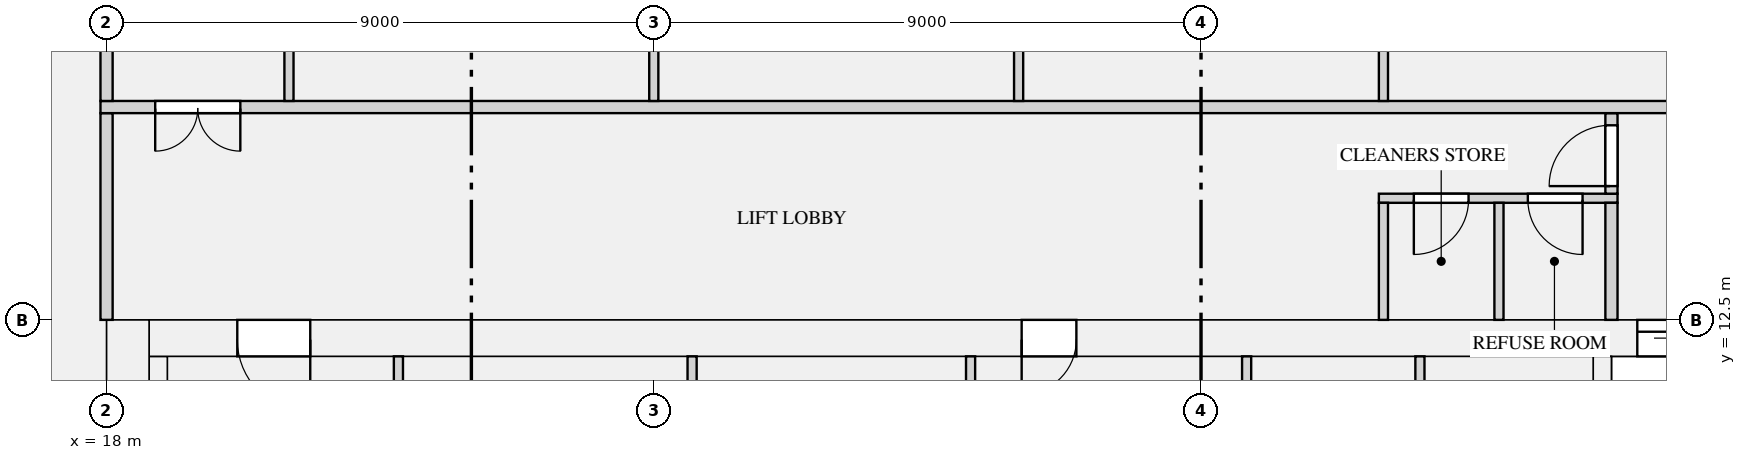
"""IFC4 building model, lengths in metres.
Left out: names, types, materials, properties, quantities, classifications, styles, units other than length and angle.
Written with IfcOpenShell. Run it as: python <this file> out.ifc"""

import sys

from ifc_helpers import new_model, si_unit, direction, frame, frame_2d, origin, place, context, subcontext, project, spatial, rectangle, extrude, element, fill, save


model = new_model("IFC4")
c1 = context("Model", 3, precision=1e-05, world=origin(), true_north=direction((0.0, 1.0)))
c2 = subcontext(c1, "Body", "Model", "MODEL_VIEW")
j1 = project(units=[si_unit("LENGTHUNIT", "METRE"), si_unit("PLANEANGLEUNIT", "RADIAN")], contexts=[c1])
p1 = place(None, origin())
s1 = spatial("IfcSite", under=j1, at=p1, CompositionType="ELEMENT")
p2 = place(p1, origin())
s2 = spatial("IfcBuilding", under=s1, at=p2, CompositionType="ELEMENT")
p3 = place(p2, frame((0.0, 0.0, 141.3)))
s3 = spatial("IfcBuildingStorey", under=s2, at=p3, CompositionType="ELEMENT", Elevation=141.3)
p4 = place(p3, frame((18.35, 0.0, 0.0), z_axis=(0.0, 0.0, 1.0), x_axis=(0.0, 1.0, 0.0)))
e1 = element("IfcWall", 1, at=p4, inside=s3, PredefinedType="SHEAR", context=c2, shape_type="SweptSolid", body=[
    extrude(rectangle(XDim=12.5, YDim=0.7, at=frame_2d((6.25, 0.0))), origin(), (0.0, 0.0, 1.0), 3.15),
])
p5 = place(p3, frame((18.7, 12.2, 0.0), z_axis=(0.0, 0.0, 1.0), x_axis=(1.0, 0.0, 0.0)))
e2 = element("IfcWall", 2, at=p5, inside=s3, PredefinedType="SHEAR", context=c2, shape_type="SweptSolid", body=[
    extrude(rectangle(XDim=34.6, YDim=0.6, at=frame_2d((17.3, 0.0))), origin(), (0.0, 0.0, 1.0), 3.15),
])
p6 = place(p5, frame((24.475, 0.0, 0.0)))
e3 = element("IfcOpeningElement", 3, at=p6, cuts=e2, PredefinedType="OPENING", context=c2, shape_type="SweptSolid", body=[
    extrude(rectangle(XDim=1.1, YDim=2.1, at=frame_2d((0.55, 1.05))), frame((0.0, 0.31, 0.0), z_axis=(0.0, -1.0, 0.0), x_axis=(1.0, 0.0, 0.0)), (0.0, 0.0, 1.0), 0.62),
])
p7 = place(p5, frame((26.725, 0.0, 0.0)))
e4 = element("IfcOpeningElement", 4, at=p7, cuts=e2, PredefinedType="OPENING", context=c2, shape_type="SweptSolid", body=[
    extrude(rectangle(XDim=1.1, YDim=2.1, at=frame_2d((0.55, 1.05))), frame((0.0, 0.31, 0.0), z_axis=(0.0, -1.0, 0.0), x_axis=(1.0, 0.0, 0.0)), (0.0, 0.0, 1.0), 0.62),
])
p8 = place(p5, frame((28.975, 0.0, 0.0)))
e5 = element("IfcOpeningElement", 5, at=p8, cuts=e2, PredefinedType="OPENING", context=c2, shape_type="SweptSolid", body=[
    extrude(rectangle(XDim=1.1, YDim=2.1, at=frame_2d((0.55, 1.05))), frame((0.0, 0.31, 0.0), z_axis=(0.0, -1.0, 0.0), x_axis=(1.0, 0.0, 0.0)), (0.0, 0.0, 1.0), 0.62),
])
p9 = place(p5, frame((14.35, 0.0, 0.0)))
e6 = element("IfcOpeningElement", 6, at=p9, cuts=e2, PredefinedType="OPENING", context=c2, shape_type="SweptSolid", body=[
    extrude(rectangle(XDim=0.9, YDim=2.1, at=frame_2d((0.45, 1.05))), frame((0.0, 0.31, 0.0), z_axis=(0.0, -1.0, 0.0), x_axis=(1.0, 0.0, 0.0)), (0.0, 0.0, 1.0), 0.62),
])
p10 = place(p5, frame((1.45, 0.0, 0.0)))
e7 = element("IfcOpeningElement", 7, at=p10, cuts=e2, PredefinedType="OPENING", context=c2, shape_type="SweptSolid", body=[
    extrude(rectangle(XDim=1.2, YDim=2.1, at=frame_2d((0.6, 1.05))), frame((0.0, 0.31, 0.0), z_axis=(0.0, -1.0, 0.0), x_axis=(1.0, 0.0, 0.0)), (0.0, 0.0, 1.0), 0.62),
])
p11 = place(p5, frame((31.95, 0.0, 0.0)))
e8 = element("IfcOpeningElement", 8, at=p11, cuts=e2, PredefinedType="OPENING", context=c2, shape_type="SweptSolid", body=[
    extrude(rectangle(XDim=1.2, YDim=2.1, at=frame_2d((0.6, 1.05))), frame((0.0, 0.31, 0.0), z_axis=(0.0, -1.0, 0.0), x_axis=(1.0, 0.0, 0.0)), (0.0, 0.0, 1.0), 0.62),
])
p12 = place(p3, frame((18.85, 1.0, 0.0), z_axis=(0.0, 0.0, 1.0), x_axis=(0.0, 1.0, 0.0)))
e9 = element("IfcWall", 9, at=p12, inside=s3, PredefinedType="SHEAR", context=c2, shape_type="SweptSolid", body=[
    extrude(rectangle(XDim=10.9, YDim=0.3, at=frame_2d((5.45, 0.0))), origin(), (0.0, 0.0, 1.0), 3.15),
])
p13 = place(p3, frame((42.6, 8.25, 0.0), z_axis=(0.0, 0.0, 1.0), x_axis=(0.0, 1.0, 0.0)))
e10 = element("IfcWall", 10, at=p13, inside=s3, PredefinedType="SHEAR", context=c2, shape_type="SweptSolid", body=[
    extrude(rectangle(XDim=3.65, YDim=0.3, at=frame_2d((1.825, 0.0))), origin(), (0.0, 0.0, 1.0), 3.15),
])
p14 = place(p3, frame((38.925, 14.5, 0.0), z_axis=(0.0, 0.0, 1.0), x_axis=(1.0, 0.0, 0.0)))
e11 = element("IfcWall", 11, at=p14, inside=s3, PredefinedType="PARTITIONING", context=c2, shape_type="SweptSolid", body=[
    extrude(rectangle(XDim=3.925, YDim=0.15, at=frame_2d((1.962, 0.0))), origin(), (0.0, 0.0, 1.0), 2.83),
])
p15 = place(p14, frame((0.575, 0.0, 0.0)))
e12 = element("IfcOpeningElement", 12, at=p15, cuts=e11, PredefinedType="OPENING", context=c2, shape_type="SweptSolid", body=[
    extrude(rectangle(XDim=0.9, YDim=2.1, at=frame_2d((0.45, 1.05))), frame((0.0, 0.085, 0.0), z_axis=(0.0, -1.0, 0.0), x_axis=(1.0, 0.0, 0.0)), (0.0, 0.0, 1.0), 0.17),
])
p16 = place(p14, frame((2.45, 0.0, 0.0)))
e13 = element("IfcOpeningElement", 13, at=p16, cuts=e11, PredefinedType="OPENING", context=c2, shape_type="SweptSolid", body=[
    extrude(rectangle(XDim=0.9, YDim=2.1, at=frame_2d((0.45, 1.05))), frame((0.0, 0.085, 0.0), z_axis=(0.0, -1.0, 0.0), x_axis=(1.0, 0.0, 0.0)), (0.0, 0.0, 1.0), 0.17),
])
for number, where, z_axis, x_axis in (
    (14, (22.8, 6.725, 0.0), (0.0, 0.0, 1.0), (0.0, 1.0, 0.0)),
    (15, (27.63, 6.725, 0.0), (0.0, 0.0, 1.0), (0.0, 1.0, 0.0)),
    (16, (39.6, 6.725, 0.0), (0.0, 0.0, 1.0), (0.0, 1.0, 0.0)),
):
    element("IfcWall", number, at=place(p3, frame(where, z_axis=z_axis, x_axis=x_axis)), inside=s3, PredefinedType="PARTITIONING", context=c2, shape_type="SweptSolid", body=[
        extrude(rectangle(XDim=5.175, YDim=0.15, at=frame_2d((2.587, 0.0))), origin(), (0.0, 0.0, 1.0), 2.83),
    ])
for number, where, z_axis, x_axis in (
    (17, (32.21, 9.345, 0.0), (0.0, 0.0, 1.0), (0.0, 1.0, 0.0)),
    (18, (36.75, 9.345, 0.0), (0.0, 0.0, 1.0), (0.0, 1.0, 0.0)),
):
    element("IfcWall", number, at=place(p3, frame(where, z_axis=z_axis, x_axis=x_axis)), inside=s3, PredefinedType="PARTITIONING", context=c2, shape_type="SweptSolid", body=[
        extrude(rectangle(XDim=2.555, YDim=0.15, at=frame_2d((1.277, 0.0))), origin(), (0.0, 0.0, 1.0), 2.83),
    ])
p17 = place(p3, frame((18.0, 12.5, 0.0), z_axis=(0.0, 0.0, 1.0), x_axis=(0.0, 1.0, 0.0)))
e19 = element("IfcWall", 19, at=p17, inside=s3, PredefinedType="PARTITIONING", context=c2, shape_type="SweptSolid", body=[
    extrude(rectangle(XDim=3.4, YDim=0.2, at=frame_2d((1.7, 0.0))), origin(), (0.0, 0.0, 1.0), 2.83),
])
for number, where, z_axis, x_axis in (
    (20, (39.0, 12.5, 0.0), (0.0, 0.0, 1.0), (0.0, 1.0, 0.0)),
    (21, (40.9, 12.5, 0.0), (0.0, 0.0, 1.0), (0.0, 1.0, 0.0)),
):
    element("IfcWall", number, at=place(p3, frame(where, z_axis=z_axis, x_axis=x_axis)), inside=s3, PredefinedType="PARTITIONING", context=c2, shape_type="SweptSolid", body=[
        extrude(rectangle(XDim=1.925, YDim=0.15, at=frame_2d((0.962, 0.0))), origin(), (0.0, 0.0, 1.0), 2.83),
    ])
p18 = place(p3, frame((42.75, 12.5, 0.0), z_axis=(0.0, 0.0, 1.0), x_axis=(0.0, 1.0, 0.0)))
e22 = element("IfcWall", 22, at=p18, inside=s3, PredefinedType="PARTITIONING", context=c2, shape_type="SweptSolid", body=[
    extrude(rectangle(XDim=1.925, YDim=0.2, at=frame_2d((0.962, 0.0))), origin(), (0.0, 0.0, 1.0), 2.83),
])
p19 = place(p3, frame((42.75, 14.575, 0.0), z_axis=(0.0, 0.0, 1.0), x_axis=(0.0, 1.0, 0.0)))
e23 = element("IfcWall", 23, at=p19, inside=s3, PredefinedType="PARTITIONING", context=c2, shape_type="SweptSolid", body=[
    extrude(rectangle(XDim=1.325, YDim=0.2, at=frame_2d((0.663, 0.0))), origin(), (0.0, 0.0, 1.0), 2.83),
])
p20 = place(p19, frame((0.125, 0.0, 0.0)))
e24 = element("IfcOpeningElement", 24, at=p20, cuts=e23, PredefinedType="OPENING", context=c2, shape_type="SweptSolid", body=[
    extrude(rectangle(XDim=1.0, YDim=2.1, at=frame_2d((0.5, 1.05))), frame((0.0, 0.11, 0.0), z_axis=(0.0, -1.0, 0.0), x_axis=(1.0, 0.0, 0.0)), (0.0, 0.0, 1.0), 0.22),
])
p21 = place(p3, frame((17.9, 16.0, 0.0), z_axis=(0.0, 0.0, 1.0), x_axis=(1.0, 0.0, 0.0)))
e25 = element("IfcWall", 25, at=p21, inside=s3, PredefinedType="PARTITIONING", context=c2, shape_type="SweptSolid", body=[
    extrude(rectangle(XDim=36.2, YDim=0.2, at=frame_2d((18.1, 0.0))), origin(), (0.0, 0.0, 1.0), 2.83),
])
p22 = place(p21, frame((0.9, 0.0, 0.0)))
e26 = element("IfcOpeningElement", 26, at=p22, cuts=e25, PredefinedType="OPENING", context=c2, shape_type="SweptSolid", body=[
    extrude(rectangle(XDim=1.4, YDim=2.1, at=frame_2d((0.7, 1.05))), frame((0.0, 0.11, 0.0), z_axis=(0.0, -1.0, 0.0), x_axis=(1.0, 0.0, 0.0)), (0.0, 0.0, 1.0), 0.22),
])
p23 = place(p21, frame((33.9, 0.0, 0.0)))
e27 = element("IfcOpeningElement", 27, at=p23, cuts=e25, PredefinedType="OPENING", context=c2, shape_type="SweptSolid", body=[
    extrude(rectangle(XDim=1.4, YDim=2.1, at=frame_2d((0.7, 1.05))), frame((0.0, 0.11, 0.0), z_axis=(0.0, -1.0, 0.0), x_axis=(1.0, 0.0, 0.0)), (0.0, 0.0, 1.0), 0.22),
])
p24 = place(p3, frame((18.0, 16.1, 0.0), z_axis=(0.0, 0.0, 1.0), x_axis=(0.0, 1.0, 0.0)))
e28 = element("IfcWall", 28, at=p24, inside=s3, PredefinedType="PARTITIONING", context=c2, shape_type="SweptSolid", body=[
    extrude(rectangle(XDim=7.8, YDim=0.2, at=frame_2d((3.9, 0.0))), origin(), (0.0, 0.0, 1.0), 2.83),
])
p25 = place(p24, frame((1.85, 0.0, 0.0)))
e29 = element("IfcOpeningElement", 29, at=p25, cuts=e28, PredefinedType="OPENING", context=c2, shape_type="SweptSolid", body=[
    extrude(rectangle(XDim=1.1, YDim=2.1, at=frame_2d((0.55, 1.05))), frame((0.0, 0.11, 0.0), z_axis=(0.0, -1.0, 0.0), x_axis=(1.0, 0.0, 0.0)), (0.0, 0.0, 1.0), 0.22),
])
for number, where, z_axis, x_axis in (
    (30, (21.0, 16.1, 0.0), (0.0, 0.0, 1.0), (0.0, 1.0, 0.0)),
    (31, (27.0, 16.1, 0.0), (0.0, 0.0, 1.0), (0.0, 1.0, 0.0)),
    (32, (33.0, 16.1, 0.0), (0.0, 0.0, 1.0), (0.0, 1.0, 0.0)),
    (33, (39.0, 16.1, 0.0), (0.0, 0.0, 1.0), (0.0, 1.0, 0.0)),
):
    element("IfcWall", number, at=place(p3, frame(where, z_axis=z_axis, x_axis=x_axis)), inside=s3, PredefinedType="PARTITIONING", context=c2, shape_type="SweptSolid", body=[
        extrude(rectangle(XDim=4.825, YDim=0.15, at=frame_2d((2.413, 0.0))), origin(), (0.0, 0.0, 1.0), 2.83),
    ])
p26 = place(p6, origin())
e34 = element("IfcDoor", 34, at=p26, inside=s3, OperationType="DOUBLE_DOOR_SLIDING", PredefinedType="DOOR", context=c2, shape_type="SweptSolid", body=[
    extrude(rectangle(XDim=1.1, YDim=2.1, at=frame_2d((0.55, 1.05))), frame((0.0, 0.025, 0.0), z_axis=(0.0, -1.0, 0.0), x_axis=(1.0, 0.0, 0.0)), (0.0, 0.0, 1.0), 0.05),
])
fill(e3, e34)
p27 = place(p15, frame((0.9, 0.0, 0.0), z_axis=(0.0, 0.0, 1.0), x_axis=(-1.0, 0.0, 0.0)))
e35 = element("IfcDoor", 35, at=p27, inside=s3, OperationType="SINGLE_SWING_RIGHT", PredefinedType="DOOR", context=c2, shape_type="SweptSolid", body=[
    extrude(rectangle(XDim=0.9, YDim=2.1, at=frame_2d((0.45, 1.05))), frame((0.0, 0.025, 0.0), z_axis=(0.0, -1.0, 0.0), x_axis=(1.0, 0.0, 0.0)), (0.0, 0.0, 1.0), 0.05),
])
fill(e12, e35)
p28 = place(p16, frame((0.9, 0.0, 0.0), z_axis=(0.0, 0.0, 1.0), x_axis=(-1.0, 0.0, 0.0)))
e36 = element("IfcDoor", 36, at=p28, inside=s3, OperationType="SINGLE_SWING_LEFT", PredefinedType="DOOR", context=c2, shape_type="SweptSolid", body=[
    extrude(rectangle(XDim=0.9, YDim=2.1, at=frame_2d((0.45, 1.05))), frame((0.0, 0.025, 0.0), z_axis=(0.0, -1.0, 0.0), x_axis=(1.0, 0.0, 0.0)), (0.0, 0.0, 1.0), 0.05),
])
fill(e13, e36)
p29 = place(p9, frame((0.9, 0.0, 0.0), z_axis=(0.0, 0.0, 1.0), x_axis=(-1.0, 0.0, 0.0)))
e37 = element("IfcDoor", 37, at=p29, inside=s3, OperationType="SINGLE_SWING_RIGHT", PredefinedType="DOOR", context=c2, shape_type="SweptSolid", body=[
    extrude(rectangle(XDim=0.9, YDim=2.1, at=frame_2d((0.45, 1.05))), frame((0.0, 0.025, 0.0), z_axis=(0.0, -1.0, 0.0), x_axis=(1.0, 0.0, 0.0)), (0.0, 0.0, 1.0), 0.05),
])
fill(e6, e37)
p30 = place(p10, frame((1.2, 0.0, 0.0), z_axis=(0.0, 0.0, 1.0), x_axis=(-1.0, 0.0, 0.0)))
e38 = element("IfcDoor", 38, at=p30, inside=s3, OperationType="SINGLE_SWING_LEFT", PredefinedType="DOOR", context=c2, shape_type="SweptSolid", body=[
    extrude(rectangle(XDim=1.2, YDim=2.1, at=frame_2d((0.6, 1.05))), frame((0.0, 0.025, 0.0), z_axis=(0.0, -1.0, 0.0), x_axis=(1.0, 0.0, 0.0)), (0.0, 0.0, 1.0), 0.05),
])
fill(e7, e38)
p31 = place(p20, origin())
e39 = element("IfcDoor", 39, at=p31, inside=s3, OperationType="SINGLE_SWING_LEFT", PredefinedType="DOOR", context=c2, shape_type="SweptSolid", body=[
    extrude(rectangle(XDim=1.0, YDim=2.1, at=frame_2d((0.5, 1.05))), frame((0.0, 0.025, 0.0), z_axis=(0.0, -1.0, 0.0), x_axis=(1.0, 0.0, 0.0)), (0.0, 0.0, 1.0), 0.05),
])
fill(e24, e39)
p32 = place(p22, frame((1.4, 0.0, 0.0), z_axis=(0.0, 0.0, 1.0), x_axis=(-1.0, 0.0, 0.0)))
e40 = element("IfcDoor", 40, at=p32, inside=s3, OperationType="DOUBLE_DOOR_SINGLE_SWING", PredefinedType="DOOR", context=c2, shape_type="SweptSolid", body=[
    extrude(rectangle(XDim=1.4, YDim=2.1, at=frame_2d((0.7, 1.05))), frame((0.0, 0.025, 0.0), z_axis=(0.0, -1.0, 0.0), x_axis=(1.0, 0.0, 0.0)), (0.0, 0.0, 1.0), 0.05),
])
fill(e26, e40)
save(model, sys.argv[1])
